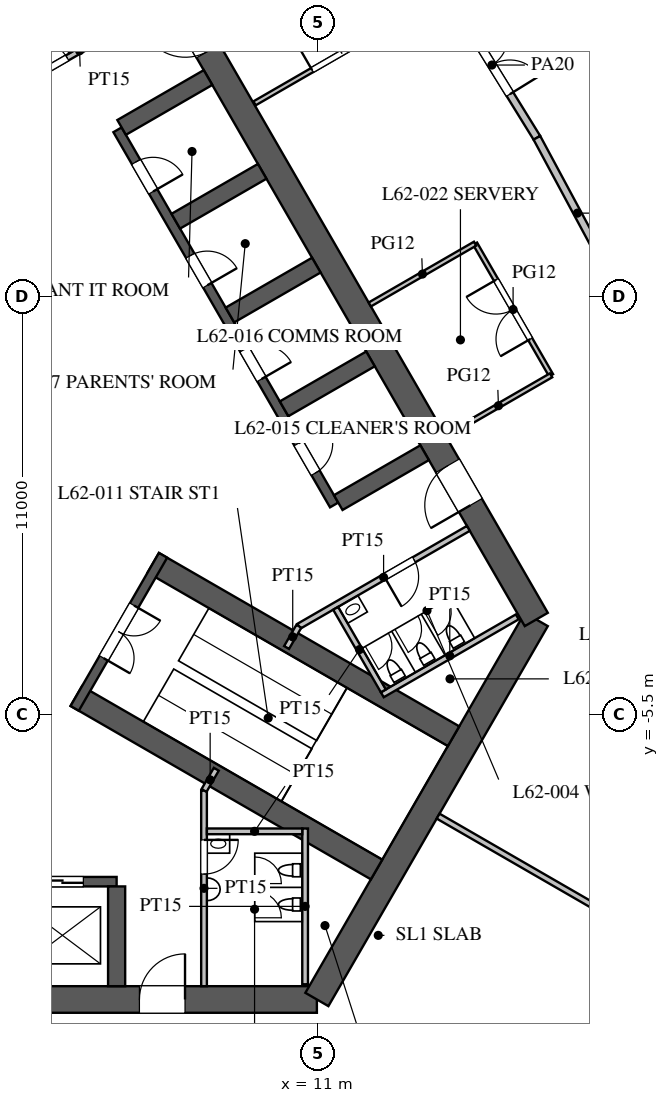
"""IFC4 building model, lengths in metres.
Left out: names, types, materials, properties, quantities, classifications, styles, units other than length and angle.
Written with IfcOpenShell. Run it as: python <this file> out.ifc"""

import sys

from ifc_helpers import new_model, si_unit, direction, frame, frame_2d, origin, place, context, subcontext, project, spatial, rectangle, extrude, element, fill, save


model = new_model("IFC4")
c1 = context("Model", 3, precision=1e-05, world=origin(), true_north=direction((0.0, 1.0)))
c2 = subcontext(c1, "Body", "Model", "MODEL_VIEW")
j1 = project(units=[si_unit("LENGTHUNIT", "METRE"), si_unit("PLANEANGLEUNIT", "RADIAN")], contexts=[c1])
p1 = place(None, origin())
s1 = spatial("IfcSite", under=j1, at=p1, CompositionType="ELEMENT")
p2 = place(p1, origin())
s2 = spatial("IfcBuilding", under=s1, at=p2, CompositionType="ELEMENT")
p3 = place(p2, frame((0.0, 0.0, 271.3)))
s3 = spatial("IfcBuildingStorey", under=s2, at=p3, CompositionType="ELEMENT", Elevation=271.3)
p4 = place(p3, frame((-10.97, -13.0, 0.0), z_axis=(0.0, 0.0, 1.0), x_axis=(1.0, 0.0, 0.0)))
e1 = element("IfcWall", 1, at=p4, inside=s3, PredefinedType="SHEAR", context=c2, shape_type="SweptSolid", body=[
    extrude(rectangle(XDim=21.939, YDim=0.7, at=frame_2d((10.97, 0.0))), origin(), (0.0, 0.0, 1.0), 5.0),
])
p5 = place(p4, frame((17.27, 0.0, 0.0)))
e2 = element("IfcOpeningElement", 2, at=p5, cuts=e1, PredefinedType="OPENING", context=c2, shape_type="SweptSolid", body=[
    extrude(rectangle(XDim=1.2, YDim=2.1, at=frame_2d((0.6, 1.05))), frame((0.0, 0.36, 0.0), z_axis=(0.0, -1.0, 0.0), x_axis=(1.0, 0.0, 0.0)), (0.0, 0.0, 1.0), 0.72),
])
p6 = place(p4, frame((3.47, 0.0, 0.0)))
e3 = element("IfcOpeningElement", 3, at=p6, cuts=e1, PredefinedType="OPENING", context=c2, shape_type="SweptSolid", body=[
    extrude(rectangle(XDim=1.2, YDim=2.1, at=frame_2d((0.6, 1.05))), frame((0.0, 0.36, 0.0), z_axis=(0.0, -1.0, 0.0), x_axis=(1.0, 0.0, 0.0)), (0.0, 0.0, 1.0), 0.72),
])
p7 = place(p3, frame((10.97, -13.0, 0.0), z_axis=(0.0, 0.0, 1.0), x_axis=(0.499995765644, 0.866027848477, 0.0)))
e4 = element("IfcWall", 4, at=p7, inside=s3, PredefinedType="SHEAR", context=c2, shape_type="SweptSolid", body=[
    extrude(rectangle(XDim=11.547, YDim=0.7, at=frame_2d((5.773, 0.0))), origin(), (0.0, 0.0, 1.0), 5.0),
])
p8 = place(p3, frame((16.743, -3.0, 0.0), z_axis=(0.0, 0.0, 1.0), x_axis=(-0.500002442456, 0.866023993627, 0.0)))
e5 = element("IfcWall", 5, at=p8, inside=s3, PredefinedType="SHEAR", context=c2, shape_type="SweptSolid", body=[
    extrude(rectangle(XDim=21.939, YDim=0.7, at=frame_2d((10.97, 0.0))), origin(), (0.0, 0.0, 1.0), 5.0),
])
p9 = place(p8, frame((17.27, 0.0, 0.0)))
e6 = element("IfcOpeningElement", 6, at=p9, cuts=e5, PredefinedType="OPENING", context=c2, shape_type="SweptSolid", body=[
    extrude(rectangle(XDim=1.2, YDim=2.1, at=frame_2d((0.6, 1.05))), frame((0.0, 0.36, 0.0), z_axis=(0.0, -1.0, 0.0), x_axis=(1.0, 0.0, 0.0)), (0.0, 0.0, 1.0), 0.72),
])
p10 = place(p8, frame((3.47, 0.0, 0.0)))
e7 = element("IfcOpeningElement", 7, at=p10, cuts=e5, PredefinedType="OPENING", context=c2, shape_type="SweptSolid", body=[
    extrude(rectangle(XDim=1.2, YDim=2.1, at=frame_2d((0.6, 1.05))), frame((0.0, 0.36, 0.0), z_axis=(0.0, -1.0, 0.0), x_axis=(1.0, 0.0, 0.0)), (0.0, 0.0, 1.0), 0.72),
])
p11 = place(p3, frame((-5.7, -9.9, 0.0), z_axis=(0.0, 0.0, 1.0), x_axis=(1.0, 0.0, 0.0)))
e8 = element("IfcWall", 8, at=p11, inside=s3, PredefinedType="SHEAR", context=c2, shape_type="SweptSolid", body=[
    extrude(rectangle(XDim=11.4, YDim=0.25, at=frame_2d((5.7, 0.0))), origin(), (0.0, 0.0, 1.0), 5.0),
])
p12 = place(p11, frame((0.875, 0.0, 0.0)))
e9 = element("IfcOpeningElement", 9, at=p12, cuts=e8, PredefinedType="OPENING", context=c2, shape_type="SweptSolid", body=[
    extrude(rectangle(XDim=1.1, YDim=2.2, at=frame_2d((0.55, 1.1))), frame((0.0, 0.135, 0.0), z_axis=(0.0, -1.0, 0.0), x_axis=(1.0, 0.0, 0.0)), (0.0, 0.0, 1.0), 0.27),
])
p13 = place(p11, frame((3.725, 0.0, 0.0)))
e10 = element("IfcOpeningElement", 10, at=p13, cuts=e8, PredefinedType="OPENING", context=c2, shape_type="SweptSolid", body=[
    extrude(rectangle(XDim=1.1, YDim=2.2, at=frame_2d((0.55, 1.1))), frame((0.0, 0.135, 0.0), z_axis=(0.0, -1.0, 0.0), x_axis=(1.0, 0.0, 0.0)), (0.0, 0.0, 1.0), 0.27),
])
p14 = place(p11, frame((6.575, 0.0, 0.0)))
e11 = element("IfcOpeningElement", 11, at=p14, cuts=e8, PredefinedType="OPENING", context=c2, shape_type="SweptSolid", body=[
    extrude(rectangle(XDim=1.1, YDim=2.2, at=frame_2d((0.55, 1.1))), frame((0.0, 0.135, 0.0), z_axis=(0.0, -1.0, 0.0), x_axis=(1.0, 0.0, 0.0)), (0.0, 0.0, 1.0), 0.27),
])
p15 = place(p11, frame((9.425, 0.0, 0.0)))
e12 = element("IfcOpeningElement", 12, at=p15, cuts=e8, PredefinedType="OPENING", context=c2, shape_type="SweptSolid", body=[
    extrude(rectangle(XDim=1.1, YDim=2.2, at=frame_2d((0.55, 1.1))), frame((0.0, 0.135, 0.0), z_axis=(0.0, -1.0, 0.0), x_axis=(1.0, 0.0, 0.0)), (0.0, 0.0, 1.0), 0.27),
])
p16 = place(p3, frame((5.7, -10.025, 0.0), z_axis=(0.0, 0.0, 1.0), x_axis=(0.0, -1.0, 0.0)))
e13 = element("IfcWall", 13, at=p16, inside=s3, PredefinedType="SHEAR", context=c2, shape_type="SweptSolid", body=[
    extrude(rectangle(XDim=2.625, YDim=0.45, at=frame_2d((1.312, 0.0))), origin(), (0.0, 0.0, 1.0), 5.0),
])
p17 = place(p3, frame((11.424, 0.014, 0.0), z_axis=(0.0, 0.0, 1.0), x_axis=(-0.500001763848, 0.866024385424, 0.0)))
e14 = element("IfcWall", 14, at=p17, inside=s3, PredefinedType="SHEAR", context=c2, shape_type="SweptSolid", body=[
    extrude(rectangle(XDim=11.4, YDim=0.25, at=frame_2d((5.7, 0.0))), origin(), (0.0, 0.0, 1.0), 5.0),
])
p18 = place(p17, frame((0.975, 0.0, 0.0)))
e15 = element("IfcOpeningElement", 15, at=p18, cuts=e14, PredefinedType="OPENING", context=c2, shape_type="SweptSolid", body=[
    extrude(rectangle(XDim=0.9, YDim=2.1, at=frame_2d((0.45, 1.05))), frame((0.0, 0.135, 0.0), z_axis=(0.0, -1.0, 0.0), x_axis=(1.0, 0.0, 0.0)), (0.0, 0.0, 1.0), 0.27),
])
p19 = place(p17, frame((3.825, 0.0, 0.0)))
e16 = element("IfcOpeningElement", 16, at=p19, cuts=e14, PredefinedType="OPENING", context=c2, shape_type="SweptSolid", body=[
    extrude(rectangle(XDim=0.9, YDim=2.1, at=frame_2d((0.45, 1.05))), frame((0.0, 0.135, 0.0), z_axis=(0.0, -1.0, 0.0), x_axis=(1.0, 0.0, 0.0)), (0.0, 0.0, 1.0), 0.27),
])
p20 = place(p17, frame((6.675, 0.0, 0.0)))
e17 = element("IfcOpeningElement", 17, at=p20, cuts=e14, PredefinedType="OPENING", context=c2, shape_type="SweptSolid", body=[
    extrude(rectangle(XDim=0.9, YDim=2.1, at=frame_2d((0.45, 1.05))), frame((0.0, 0.135, 0.0), z_axis=(0.0, -1.0, 0.0), x_axis=(1.0, 0.0, 0.0)), (0.0, 0.0, 1.0), 0.27),
])
p21 = place(p17, frame((9.525, 0.0, 0.0)))
e18 = element("IfcOpeningElement", 18, at=p21, cuts=e14, PredefinedType="OPENING", context=c2, shape_type="SweptSolid", body=[
    extrude(rectangle(XDim=0.9, YDim=2.1, at=frame_2d((0.45, 1.05))), frame((0.0, 0.135, 0.0), z_axis=(0.0, -1.0, 0.0), x_axis=(1.0, 0.0, 0.0)), (0.0, 0.0, 1.0), 0.27),
])
for number, where, z_axis, x_axis in (
    (19, (11.532, 0.076, 0.0), (0.0, 0.0, 1.0), (0.866, 0.5, 0.0)),
    (20, (10.107, 2.544, 0.0), (0.0, 0.0, 1.0), (0.866, 0.5, 0.0)),
    (21, (8.682, 5.012, 0.0), (0.0, 0.0, 1.0), (0.866, 0.5, 0.0)),
    (22, (7.257, 7.481, 0.0), (0.0, 0.0, 1.0), (0.866, 0.5, 0.0)),
    (23, (5.832, 9.949, 0.0), (0.0, 0.0, 1.0), (0.866, 0.5, 0.0)),
):
    element("IfcWall", number, at=place(p3, frame(where, z_axis=z_axis, x_axis=x_axis)), inside=s3, PredefinedType="SHEAR", context=c2, shape_type="SweptSolid", body=[
        extrude(rectangle(XDim=2.625, YDim=0.45, at=frame_2d((1.312, 0.0))), origin(), (0.0, 0.0, 1.0), 5.0),
    ])
for number, where, z_axis, x_axis in (
    (24, (4.638, -5.016, 0.0), (0.0, 0.0, 1.0), (0.866, -0.5, 0.0)),
    (25, (6.663, -1.509, 0.0), (0.0, 0.0, 1.0), (0.866, -0.5, 0.0)),
):
    element("IfcWall", number, at=place(p3, frame(where, z_axis=z_axis, x_axis=x_axis)), inside=s3, PredefinedType="SHEAR", context=c2, shape_type="SweptSolid", body=[
        extrude(rectangle(XDim=9.125, YDim=0.6, at=frame_2d((4.562, 0.0))), origin(), (0.0, 0.0, 1.0), 5.0),
    ])
p22 = place(p3, frame((4.597, -5.339, 0.0), z_axis=(0.0, 0.0, 1.0), x_axis=(0.499984536904, 0.866034331223, 0.0)))
e26 = element("IfcWall", 26, at=p22, inside=s3, PredefinedType="SHEAR", context=c2, shape_type="SweptSolid", body=[
    extrude(rectangle(XDim=4.65, YDim=0.25, at=frame_2d((2.325, 0.0))), origin(), (0.0, 0.0, 1.0), 5.0),
])
p23 = place(p22, frame((1.525, 0.0, 0.0)))
e27 = element("IfcOpeningElement", 27, at=p23, cuts=e26, PredefinedType="OPENING", context=c2, shape_type="SweptSolid", body=[
    extrude(rectangle(XDim=1.6, YDim=2.1, at=frame_2d((0.8, 1.05))), frame((0.0, 0.135, 0.0), z_axis=(0.0, -1.0, 0.0), x_axis=(1.0, 0.0, 0.0)), (0.0, 0.0, 1.0), 0.27),
])
p24 = place(p3, frame((8.0, -7.5, 0.0), z_axis=(0.0, 0.0, 1.0), x_axis=(0.0, -1.0, 0.0)))
e28 = element("IfcWall", 28, at=p24, inside=s3, PredefinedType="PARTITIONING", context=c2, shape_type="SweptSolid", body=[
    extrude(rectangle(XDim=5.15, YDim=0.15, at=frame_2d((2.575, 0.0))), origin(), (0.0, 0.0, 1.0), 4.8),
])
p25 = place(p24, frame((1.3, 0.0, 0.0)))
e29 = element("IfcOpeningElement", 29, at=p25, cuts=e28, PredefinedType="OPENING", context=c2, shape_type="SweptSolid", body=[
    extrude(rectangle(XDim=0.9, YDim=2.1, at=frame_2d((0.45, 1.05))), frame((0.0, 0.085, 0.0), z_axis=(0.0, -1.0, 0.0), x_axis=(1.0, 0.0, 0.0)), (0.0, 0.0, 1.0), 0.17),
])
p26 = place(p3, frame((2.495, 10.678, 0.0), z_axis=(0.0, 0.0, 1.0), x_axis=(0.866037967349, 0.499978238636, 0.0)))
e30 = element("IfcWall", 30, at=p26, inside=s3, PredefinedType="PARTITIONING", context=c2, shape_type="SweptSolid", body=[
    extrude(rectangle(XDim=5.15, YDim=0.15, at=frame_2d((2.575, 0.0))), origin(), (0.0, 0.0, 1.0), 4.8),
])
p27 = place(p26, frame((1.3, 0.0, 0.0)))
e31 = element("IfcOpeningElement", 31, at=p27, cuts=e30, PredefinedType="OPENING", context=c2, shape_type="SweptSolid", body=[
    extrude(rectangle(XDim=0.9, YDim=2.1, at=frame_2d((0.45, 1.05))), frame((0.0, 0.085, 0.0), z_axis=(0.0, -1.0, 0.0), x_axis=(1.0, 0.0, 0.0)), (0.0, 0.0, 1.0), 0.17),
])
p28 = place(p3, frame((10.495, -3.178, 0.0), z_axis=(0.0, 0.0, 1.0), x_axis=(0.866037967349, 0.499978238636, 0.0)))
e32 = element("IfcWall", 32, at=p28, inside=s3, PredefinedType="PARTITIONING", context=c2, shape_type="SweptSolid", body=[
    extrude(rectangle(XDim=5.15, YDim=0.15, at=frame_2d((2.575, 0.0))), origin(), (0.0, 0.0, 1.0), 4.8),
])
p29 = place(p28, frame((2.6, 0.0, 0.0)))
e33 = element("IfcOpeningElement", 33, at=p29, cuts=e32, PredefinedType="OPENING", context=c2, shape_type="SweptSolid", body=[
    extrude(rectangle(XDim=0.9, YDim=2.1, at=frame_2d((0.45, 1.05))), frame((0.0, 0.085, 0.0), z_axis=(0.0, -1.0, 0.0), x_axis=(1.0, 0.0, 0.0)), (0.0, 0.0, 1.0), 0.17),
])
for number, where, z_axis, x_axis in (
    (34, (8.0, -7.5, 0.0), (0.0, 0.0, 1.0), (0.5, 0.866, 0.0)),
    (35, (10.495, -3.178, 0.0), (0.0, 0.0, 1.0), (-0.5, -0.866, 0.0)),
):
    element("IfcWall", number, at=place(p3, frame(where, z_axis=z_axis, x_axis=x_axis)), inside=s3, PredefinedType="PARTITIONING", context=c2, shape_type="SweptSolid", body=[
        extrude(rectangle(XDim=0.645, YDim=0.15, at=frame_2d((0.323, 0.0))), origin(), (0.0, 0.0, 1.0), 4.8),
    ])
p30 = place(p3, frame((10.66, -8.5, 0.0), z_axis=(0.0, 0.0, 1.0), x_axis=(0.0, -1.0, 0.0)))
e36 = element("IfcWall", 36, at=p30, inside=s3, PredefinedType="PARTITIONING", context=c2, shape_type="SweptSolid", body=[
    extrude(rectangle(XDim=4.1, YDim=0.15, at=frame_2d((2.05, 0.0))), origin(), (0.0, 0.0, 1.0), 4.8),
])
p31 = place(p3, frame((8.075, -8.575, 0.0), z_axis=(0.0, 0.0, 1.0), x_axis=(1.0, 0.0, 0.0)))
e37 = element("IfcWall", 37, at=p31, inside=s3, PredefinedType="PARTITIONING", context=c2, shape_type="SweptSolid", body=[
    extrude(rectangle(XDim=2.51, YDim=0.15, at=frame_2d((1.255, 0.0))), origin(), (0.0, 0.0, 1.0), 4.8),
])
p32 = place(p3, frame((12.691, -4.982, 0.0), z_axis=(0.0, 0.0, 1.0), x_axis=(0.8660249478, 0.500000789788, 0.0)))
e38 = element("IfcWall", 38, at=p32, inside=s3, PredefinedType="PARTITIONING", context=c2, shape_type="SweptSolid", body=[
    extrude(rectangle(XDim=4.1, YDim=0.15, at=frame_2d((2.05, 0.0))), origin(), (0.0, 0.0, 1.0), 4.8),
])
p33 = place(p3, frame((11.464, -2.706, 0.0), z_axis=(0.0, 0.0, 1.0), x_axis=(0.50001992892, -0.866013897511, 0.0)))
e39 = element("IfcWall", 39, at=p33, inside=s3, PredefinedType="PARTITIONING", context=c2, shape_type="SweptSolid", body=[
    extrude(rectangle(XDim=2.51, YDim=0.15, at=frame_2d((1.255, 0.0))), origin(), (0.0, 0.0, 1.0), 4.8),
])
p34 = place(p3, frame((14.159, -8.175, 0.0), z_axis=(0.0, 0.0, 1.0), x_axis=(0.866026905467, -0.499997399001, 0.0)))
e40 = element("IfcWall", 40, at=p34, inside=s3, PredefinedType="PARTITIONING", context=c2, shape_type="SweptSolid", body=[
    extrude(rectangle(XDim=13.4, YDim=0.15, at=frame_2d((6.7, 0.0))), origin(), (0.0, 0.0, 1.0), 3.3),
])
p35 = place(p3, frame((17.133, 3.425, 0.0), z_axis=(0.0, 0.0, 1.0), x_axis=(-0.49999894854, 0.866026010844, 0.0)))
e41 = element("IfcWall", 41, at=p35, inside=s3, PredefinedType="PARTITIONING", context=c2, shape_type="SweptSolid", body=[
    extrude(rectangle(XDim=4.0, YDim=0.12, at=frame_2d((2.0, 0.0))), origin(), (0.0, 0.0, 1.0), 3.6),
])
p36 = place(p35, frame((1.1, 0.0, 0.0)))
e42 = element("IfcOpeningElement", 42, at=p36, cuts=e41, PredefinedType="OPENING", context=c2, shape_type="SweptSolid", body=[
    extrude(rectangle(XDim=1.8, YDim=2.1, at=frame_2d((0.9, 1.05))), frame((0.0, 0.07, 0.0), z_axis=(0.0, -1.0, 0.0), x_axis=(1.0, 0.0, 0.0)), (0.0, 0.0, 1.0), 0.14),
])
for number, where, z_axis, x_axis in (
    (43, (12.361, 5.289, 0.0), (0.0, 0.0, 1.0), (0.866, 0.5, 0.0)),
    (44, (14.361, 1.825, 0.0), (0.0, 0.0, 1.0), (0.866, 0.5, 0.0)),
):
    element("IfcWall", number, at=place(p3, frame(where, z_axis=z_axis, x_axis=x_axis)), inside=s3, PredefinedType="PARTITIONING", context=c2, shape_type="SweptSolid", body=[
        extrude(rectangle(XDim=3.2, YDim=0.12, at=frame_2d((1.6, 0.0))), origin(), (0.0, 0.0, 1.0), 3.6),
    ])
p37 = place(p3, frame((16.759, 9.676, 0.0), z_axis=(0.0, 0.0, 1.0), x_axis=(-0.525996140194, 0.850486954927, 0.0)))
e45 = element("IfcWall", 45, at=p37, inside=s3, PredefinedType="PARTITIONING", context=c2, shape_type="SweptSolid", body=[
    extrude(rectangle(XDim=4.502, YDim=0.2, at=frame_2d((2.251, 0.0))), origin(), (0.0, 0.0, 1.0), 3.6),
])
p38 = place(p37, frame((1.35, 0.0, 0.0)))
e46 = element("IfcOpeningElement", 46, at=p38, cuts=e45, PredefinedType="OPENING", context=c2, shape_type="SweptSolid", body=[
    extrude(rectangle(XDim=1.8, YDim=2.1, at=frame_2d((0.9, 1.05))), frame((0.0, 0.11, 0.0), z_axis=(0.0, -1.0, 0.0), x_axis=(1.0, 0.0, 0.0)), (0.0, 0.0, 1.0), 0.22),
])
p39 = place(p3, frame((18.891, 5.71, 0.0), z_axis=(0.0, 0.0, 1.0), x_axis=(-0.473524102582, 0.880780860529, 0.0)))
e47 = element("IfcWall", 47, at=p39, inside=s3, PredefinedType="PARTITIONING", context=c2, shape_type="SweptSolid", body=[
    extrude(rectangle(XDim=4.502, YDim=0.2, at=frame_2d((2.251, 0.0))), origin(), (0.0, 0.0, 1.0), 3.6),
])
p40 = place(p3, frame((9.329, 10.582, 0.0), z_axis=(0.0, 0.0, 1.0), x_axis=(0.86602503688, 0.500000635496, 0.0)))
e48 = element("IfcWall", 48, at=p40, inside=s3, PredefinedType="PARTITIONING", context=c2, shape_type="SweptSolid", body=[
    extrude(rectangle(XDim=8.812, YDim=0.12, at=frame_2d((4.406, 0.0))), origin(), (0.0, 0.0, 1.0), 3.4),
])
p41 = place(p40, frame((1.75, 0.0, 0.0)))
e49 = element("IfcOpeningElement", 49, at=p41, cuts=e48, PredefinedType="OPENING", context=c2, shape_type="SweptSolid", body=[
    extrude(rectangle(XDim=1.8, YDim=2.1, at=frame_2d((0.9, 1.05))), frame((0.0, 0.07, 0.0), z_axis=(0.0, -1.0, 0.0), x_axis=(1.0, 0.0, 0.0)), (0.0, 0.0, 1.0), 0.14),
])
p42 = place(p25, origin())
e50 = element("IfcDoor", 50, at=p42, inside=s3, OperationType="SINGLE_SWING_LEFT", PredefinedType="DOOR", context=c2, shape_type="SweptSolid", body=[
    extrude(rectangle(XDim=0.9, YDim=2.1, at=frame_2d((0.45, 1.05))), frame((0.0, 0.025, 0.0), z_axis=(0.0, -1.0, 0.0), x_axis=(1.0, 0.0, 0.0)), (0.0, 0.0, 1.0), 0.05),
])
fill(e29, e50)
p43 = place(p27, origin())
e51 = element("IfcDoor", 51, at=p43, inside=s3, OperationType="SINGLE_SWING_LEFT", PredefinedType="DOOR", context=c2, shape_type="SweptSolid", body=[
    extrude(rectangle(XDim=0.9, YDim=2.1, at=frame_2d((0.45, 1.05))), frame((0.0, 0.025, 0.0), z_axis=(0.0, -1.0, 0.0), x_axis=(1.0, 0.0, 0.0)), (0.0, 0.0, 1.0), 0.05),
])
fill(e31, e51)
p44 = place(p29, frame((0.9, 0.0, 0.0), z_axis=(0.0, 0.0, 1.0), x_axis=(-1.0, 0.0, 0.0)))
e52 = element("IfcDoor", 52, at=p44, inside=s3, OperationType="SINGLE_SWING_RIGHT", PredefinedType="DOOR", context=c2, shape_type="SweptSolid", body=[
    extrude(rectangle(XDim=0.9, YDim=2.1, at=frame_2d((0.45, 1.05))), frame((0.0, 0.025, 0.0), z_axis=(0.0, -1.0, 0.0), x_axis=(1.0, 0.0, 0.0)), (0.0, 0.0, 1.0), 0.05),
])
fill(e33, e52)
p45 = place(p23, frame((1.6, 0.0, 0.0), z_axis=(0.0, 0.0, 1.0), x_axis=(-1.0, 0.0, 0.0)))
e53 = element("IfcDoor", 53, at=p45, inside=s3, OperationType="DOUBLE_DOOR_SINGLE_SWING", PredefinedType="DOOR", context=c2, shape_type="SweptSolid", body=[
    extrude(rectangle(XDim=1.6, YDim=2.1, at=frame_2d((0.8, 1.05))), frame((0.0, 0.025, 0.0), z_axis=(0.0, -1.0, 0.0), x_axis=(1.0, 0.0, 0.0)), (0.0, 0.0, 1.0), 0.05),
])
fill(e27, e53)
p46 = place(p5, origin())
e54 = element("IfcDoor", 54, at=p46, inside=s3, OperationType="SINGLE_SWING_RIGHT", PredefinedType="DOOR", context=c2, shape_type="SweptSolid", body=[
    extrude(rectangle(XDim=1.2, YDim=2.1, at=frame_2d((0.6, 1.05))), frame((0.0, 0.025, 0.0), z_axis=(0.0, -1.0, 0.0), x_axis=(1.0, 0.0, 0.0)), (0.0, 0.0, 1.0), 0.05),
])
fill(e2, e54)
p47 = place(p9, origin())
e55 = element("IfcDoor", 55, at=p47, inside=s3, OperationType="SINGLE_SWING_RIGHT", PredefinedType="DOOR", context=c2, shape_type="SweptSolid", body=[
    extrude(rectangle(XDim=1.2, YDim=2.1, at=frame_2d((0.6, 1.05))), frame((0.0, 0.025, 0.0), z_axis=(0.0, -1.0, 0.0), x_axis=(1.0, 0.0, 0.0)), (0.0, 0.0, 1.0), 0.05),
])
fill(e6, e55)
p48 = place(p10, origin())
e56 = element("IfcDoor", 56, at=p48, inside=s3, OperationType="SINGLE_SWING_LEFT", PredefinedType="DOOR", context=c2, shape_type="SweptSolid", body=[
    extrude(rectangle(XDim=1.2, YDim=2.1, at=frame_2d((0.6, 1.05))), frame((0.0, 0.025, 0.0), z_axis=(0.0, -1.0, 0.0), x_axis=(1.0, 0.0, 0.0)), (0.0, 0.0, 1.0), 0.05),
])
fill(e7, e56)
p49 = place(p18, frame((0.9, 0.0, 0.0), z_axis=(0.0, 0.0, 1.0), x_axis=(-1.0, 0.0, 0.0)))
e57 = element("IfcDoor", 57, at=p49, inside=s3, OperationType="SINGLE_SWING_LEFT", PredefinedType="DOOR", context=c2, shape_type="SweptSolid", body=[
    extrude(rectangle(XDim=0.9, YDim=2.1, at=frame_2d((0.45, 1.05))), frame((0.0, 0.025, 0.0), z_axis=(0.0, -1.0, 0.0), x_axis=(1.0, 0.0, 0.0)), (0.0, 0.0, 1.0), 0.05),
])
fill(e15, e57)
p50 = place(p19, frame((0.9, 0.0, 0.0), z_axis=(0.0, 0.0, 1.0), x_axis=(-1.0, 0.0, 0.0)))
e58 = element("IfcDoor", 58, at=p50, inside=s3, OperationType="SINGLE_SWING_RIGHT", PredefinedType="DOOR", context=c2, shape_type="SweptSolid", body=[
    extrude(rectangle(XDim=0.9, YDim=2.1, at=frame_2d((0.45, 1.05))), frame((0.0, 0.025, 0.0), z_axis=(0.0, -1.0, 0.0), x_axis=(1.0, 0.0, 0.0)), (0.0, 0.0, 1.0), 0.05),
])
fill(e16, e58)
p51 = place(p20, frame((0.9, 0.0, 0.0), z_axis=(0.0, 0.0, 1.0), x_axis=(-1.0, 0.0, 0.0)))
e59 = element("IfcDoor", 59, at=p51, inside=s3, OperationType="SINGLE_SWING_RIGHT", PredefinedType="DOOR", context=c2, shape_type="SweptSolid", body=[
    extrude(rectangle(XDim=0.9, YDim=2.1, at=frame_2d((0.45, 1.05))), frame((0.0, 0.025, 0.0), z_axis=(0.0, -1.0, 0.0), x_axis=(1.0, 0.0, 0.0)), (0.0, 0.0, 1.0), 0.05),
])
fill(e17, e59)
p52 = place(p21, frame((0.9, 0.0, 0.0), z_axis=(0.0, 0.0, 1.0), x_axis=(-1.0, 0.0, 0.0)))
e60 = element("IfcDoor", 60, at=p52, inside=s3, OperationType="SINGLE_SWING_RIGHT", PredefinedType="DOOR", context=c2, shape_type="SweptSolid", body=[
    extrude(rectangle(XDim=0.9, YDim=2.1, at=frame_2d((0.45, 1.05))), frame((0.0, 0.025, 0.0), z_axis=(0.0, -1.0, 0.0), x_axis=(1.0, 0.0, 0.0)), (0.0, 0.0, 1.0), 0.05),
])
fill(e18, e60)
p53 = place(p41, origin())
e61 = element("IfcDoor", 61, at=p53, inside=s3, OperationType="DOUBLE_DOOR_SINGLE_SWING", PredefinedType="DOOR", context=c2, shape_type="SweptSolid", body=[
    extrude(rectangle(XDim=1.8, YDim=2.1, at=frame_2d((0.9, 1.05))), frame((0.0, 0.025, 0.0), z_axis=(0.0, -1.0, 0.0), x_axis=(1.0, 0.0, 0.0)), (0.0, 0.0, 1.0), 0.05),
])
fill(e49, e61)
p54 = place(p36, origin())
e62 = element("IfcDoor", 62, at=p54, inside=s3, OperationType="DOUBLE_DOOR_SINGLE_SWING", PredefinedType="DOOR", context=c2, shape_type="SweptSolid", body=[
    extrude(rectangle(XDim=1.8, YDim=2.1, at=frame_2d((0.9, 1.05))), frame((0.0, 0.025, 0.0), z_axis=(0.0, -1.0, 0.0), x_axis=(1.0, 0.0, 0.0)), (0.0, 0.0, 1.0), 0.05),
])
fill(e42, e62)
p55 = place(p38, frame((1.8, 0.0, 0.0), z_axis=(0.0, 0.0, 1.0), x_axis=(-1.0, 0.0, 0.0)))
e63 = element("IfcDoor", 63, at=p55, inside=s3, OperationType="DOUBLE_DOOR_SINGLE_SWING", PredefinedType="DOOR", context=c2, shape_type="SweptSolid", body=[
    extrude(rectangle(XDim=1.8, YDim=2.1, at=frame_2d((0.9, 1.05))), frame((0.0, 0.025, 0.0), z_axis=(0.0, -1.0, 0.0), x_axis=(1.0, 0.0, 0.0)), (0.0, 0.0, 1.0), 0.05),
])
fill(e46, e63)
p56 = place(p15, origin())
e64 = element("IfcDoor", 64, at=p56, inside=s3, OperationType="DOUBLE_DOOR_SLIDING", PredefinedType="DOOR", context=c2, shape_type="SweptSolid", body=[
    extrude(rectangle(XDim=1.1, YDim=2.2, at=frame_2d((0.55, 1.1))), frame((0.0, 0.025, 0.0), z_axis=(0.0, -1.0, 0.0), x_axis=(1.0, 0.0, 0.0)), (0.0, 0.0, 1.0), 0.05),
])
fill(e12, e64)
save(model, sys.argv[1])
